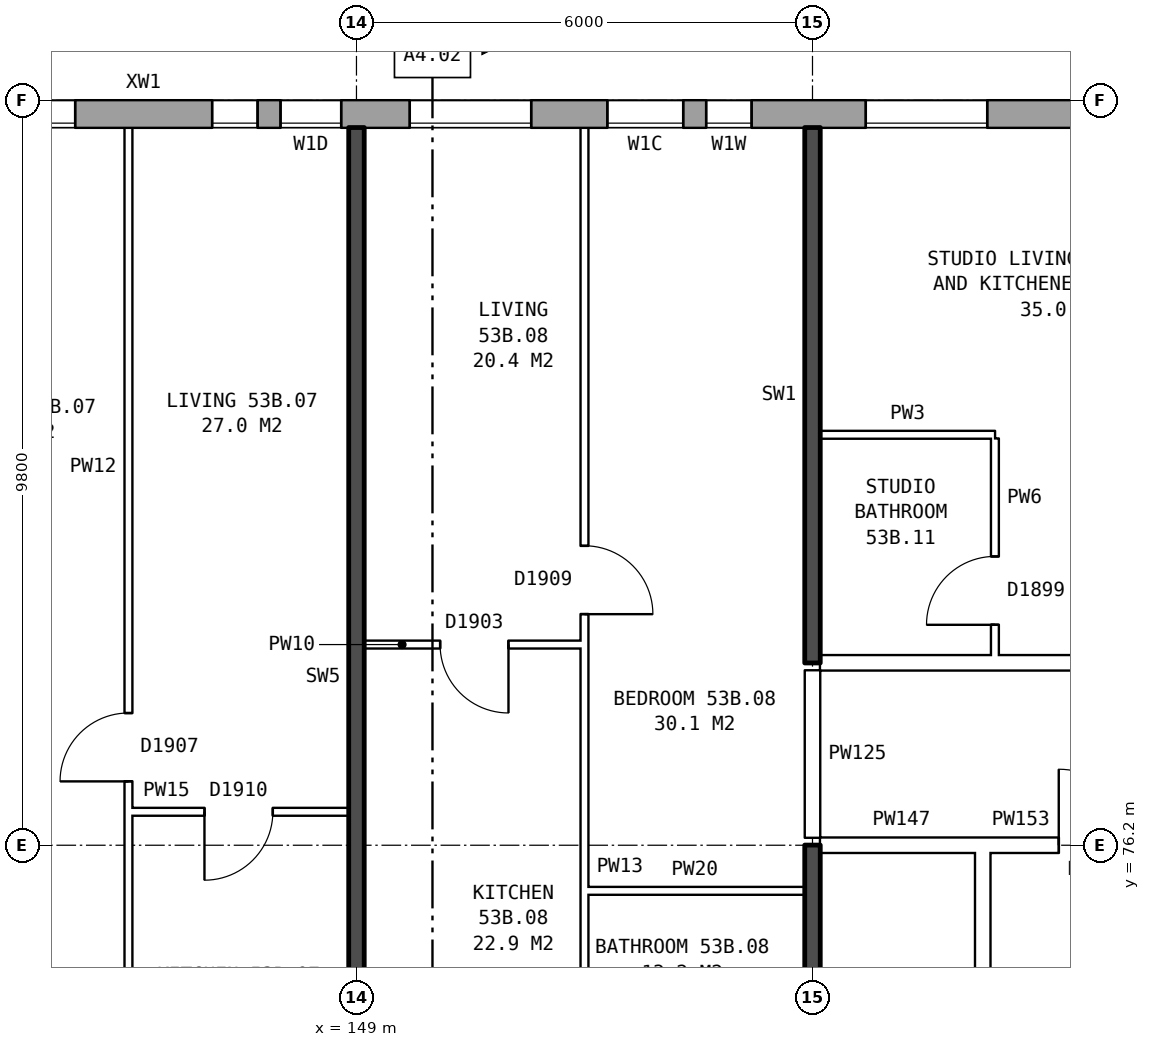
"""IFC4 building model, lengths in metres.
Left out: names, types, materials, properties, quantities, classifications, styles, units other than length and angle.
Written with IfcOpenShell. Run it as: python <this file> out.ifc"""

import sys

from ifc_helpers import new_model, si_unit, direction, frame, frame_2d, origin, place, context, subcontext, project, spatial, rectangle, extrude, element, fill, save


model = new_model("IFC4")
c1 = context("Model", 3, precision=1e-05, world=origin(), true_north=direction((0.0, 1.0)))
c2 = subcontext(c1, "Body", "Model", "MODEL_VIEW")
j1 = project(units=[si_unit("LENGTHUNIT", "METRE"), si_unit("PLANEANGLEUNIT", "RADIAN")], contexts=[c1])
p1 = place(None, origin())
s1 = spatial("IfcSite", under=j1, at=p1, CompositionType="ELEMENT")
p2 = place(p1, origin())
s2 = spatial("IfcBuilding", under=s1, at=p2, CompositionType="ELEMENT")
p3 = place(p2, frame((0.0, 0.0, 188.2)))
s3 = spatial("IfcBuildingStorey", under=s2, at=p3, CompositionType="ELEMENT", Elevation=188.2)
p4 = place(p3, frame((167.175, 85.82, 0.0), z_axis=(0.0, 0.0, 1.0), x_axis=(-1.0, 0.0, 0.0)))
e1 = element("IfcWall", 1, at=p4, inside=s3, PredefinedType="STANDARD", context=c2, shape_type="SweptSolid", body=[
    extrude(rectangle(XDim=33.101, YDim=0.36, at=frame_2d((16.55, 0.0))), origin(), (0.0, 0.0, 1.0), 2.85),
])
p5 = place(p4, frame((0.875, 0.0, 0.8)))
e2 = element("IfcOpeningElement", 2, at=p5, cuts=e1, PredefinedType="OPENING", context=c2, shape_type="SweptSolid", body=[
    extrude(rectangle(XDim=1.6, YDim=1.8, at=frame_2d((0.8, 0.9))), frame((0.0, 0.19, 0.0), z_axis=(0.0, -1.0, 0.0), x_axis=(1.0, 0.0, 0.0)), (0.0, 0.0, 1.0), 0.38),
])
p6 = place(p4, frame((3.875, 0.0, 0.8)))
e3 = element("IfcOpeningElement", 3, at=p6, cuts=e1, PredefinedType="OPENING", context=c2, shape_type="SweptSolid", body=[
    extrude(rectangle(XDim=1.6, YDim=1.8, at=frame_2d((0.8, 0.9))), frame((0.0, 0.19, 0.0), z_axis=(0.0, -1.0, 0.0), x_axis=(1.0, 0.0, 0.0)), (0.0, 0.0, 1.0), 0.38),
])
p7 = place(p4, frame((6.875, 0.0, 0.8)))
e4 = element("IfcOpeningElement", 4, at=p7, cuts=e1, PredefinedType="OPENING", context=c2, shape_type="SweptSolid", body=[
    extrude(rectangle(XDim=1.6, YDim=1.8, at=frame_2d((0.8, 0.9))), frame((0.0, 0.19, 0.0), z_axis=(0.0, -1.0, 0.0), x_axis=(1.0, 0.0, 0.0)), (0.0, 0.0, 1.0), 0.38),
])
p8 = place(p4, frame((9.875, 0.0, 0.8)))
e5 = element("IfcOpeningElement", 5, at=p8, cuts=e1, PredefinedType="OPENING", context=c2, shape_type="SweptSolid", body=[
    extrude(rectangle(XDim=1.6, YDim=1.8, at=frame_2d((0.8, 0.9))), frame((0.0, 0.19, 0.0), z_axis=(0.0, -1.0, 0.0), x_axis=(1.0, 0.0, 0.0)), (0.0, 0.0, 1.0), 0.38),
])
p9 = place(p4, frame((12.975, 0.0, 0.15)))
e6 = element("IfcOpeningElement", 6, at=p9, cuts=e1, PredefinedType="OPENING", context=c2, shape_type="SweptSolid", body=[
    extrude(rectangle(XDim=0.6, YDim=0.9, at=frame_2d((0.3, 0.45))), frame((0.0, 0.19, 0.0), z_axis=(0.0, -1.0, 0.0), x_axis=(1.0, 0.0, 0.0)), (0.0, 0.0, 1.0), 0.38),
])
p10 = place(p4, frame((15.875, 0.0, 0.8)))
e7 = element("IfcOpeningElement", 7, at=p10, cuts=e1, PredefinedType="OPENING", context=c2, shape_type="SweptSolid", body=[
    extrude(rectangle(XDim=1.6, YDim=1.8, at=frame_2d((0.8, 0.9))), frame((0.0, 0.19, 0.0), z_axis=(0.0, -1.0, 0.0), x_axis=(1.0, 0.0, 0.0)), (0.0, 0.0, 1.0), 0.38),
])
p11 = place(p4, frame((18.375, 0.0, 0.35)))
e8 = element("IfcOpeningElement", 8, at=p11, cuts=e1, PredefinedType="OPENING", context=c2, shape_type="SweptSolid", body=[
    extrude(rectangle(XDim=0.8, YDim=1.8, at=frame_2d((0.4, 0.9))), frame((0.0, 0.19, 0.0), z_axis=(0.0, -1.0, 0.0), x_axis=(1.0, 0.0, 0.0)), (0.0, 0.0, 1.0), 0.38),
])
p12 = place(p4, frame((21.875, 0.0, 0.8)))
e9 = element("IfcOpeningElement", 9, at=p12, cuts=e1, PredefinedType="OPENING", context=c2, shape_type="SweptSolid", body=[
    extrude(rectangle(XDim=1.6, YDim=1.8, at=frame_2d((0.8, 0.9))), frame((0.0, 0.19, 0.0), z_axis=(0.0, -1.0, 0.0), x_axis=(1.0, 0.0, 0.0)), (0.0, 0.0, 1.0), 0.38),
])
p13 = place(p4, frame((24.875, 0.0, 0.8)))
e10 = element("IfcOpeningElement", 10, at=p13, cuts=e1, PredefinedType="OPENING", context=c2, shape_type="SweptSolid", body=[
    extrude(rectangle(XDim=1.6, YDim=1.8, at=frame_2d((0.8, 0.9))), frame((0.0, 0.19, 0.0), z_axis=(0.0, -1.0, 0.0), x_axis=(1.0, 0.0, 0.0)), (0.0, 0.0, 1.0), 0.38),
])
p14 = place(p4, frame((27.875, 0.0, 0.8)))
e11 = element("IfcOpeningElement", 11, at=p14, cuts=e1, PredefinedType="OPENING", context=c2, shape_type="SweptSolid", body=[
    extrude(rectangle(XDim=1.6, YDim=1.8, at=frame_2d((0.8, 0.9))), frame((0.0, 0.19, 0.0), z_axis=(0.0, -1.0, 0.0), x_axis=(1.0, 0.0, 0.0)), (0.0, 0.0, 1.0), 0.38),
])
p15 = place(p4, frame((30.875, 0.0, 0.8)))
e12 = element("IfcOpeningElement", 12, at=p15, cuts=e1, PredefinedType="OPENING", context=c2, shape_type="SweptSolid", body=[
    extrude(rectangle(XDim=1.6, YDim=1.8, at=frame_2d((0.8, 0.9))), frame((0.0, 0.19, 0.0), z_axis=(0.0, -1.0, 0.0), x_axis=(1.0, 0.0, 0.0)), (0.0, 0.0, 1.0), 0.38),
])
p16 = place(p4, frame((13.875, 0.0, 0.25)))
e13 = element("IfcOpeningElement", 13, at=p16, cuts=e1, PredefinedType="OPENING", context=c2, shape_type="SweptSolid", body=[
    extrude(rectangle(XDim=1.0, YDim=1.8, at=frame_2d((0.5, 0.9))), frame((0.0, 0.19, 0.0), z_axis=(0.0, -1.0, 0.0), x_axis=(1.0, 0.0, 0.0)), (0.0, 0.0, 1.0), 0.38),
])
p17 = place(p4, frame((19.475, 0.0, 0.15)))
e14 = element("IfcOpeningElement", 14, at=p17, cuts=e1, PredefinedType="OPENING", context=c2, shape_type="SweptSolid", body=[
    extrude(rectangle(XDim=0.6, YDim=0.9, at=frame_2d((0.3, 0.45))), frame((0.0, 0.19, 0.0), z_axis=(0.0, -1.0, 0.0), x_axis=(1.0, 0.0, 0.0)), (0.0, 0.0, 1.0), 0.38),
])
p18 = place(p3, frame((157.24, 63.9, 0.0), z_axis=(0.0, 0.0, 1.0), x_axis=(0.0, 1.0, 0.0)))
e15 = element("IfcWall", 15, at=p18, inside=s3, PredefinedType="PARTITIONING", context=c2, shape_type="SweptSolid", body=[
    extrude(rectangle(XDim=12.2, YDim=0.2, at=frame_2d((6.1, 0.0))), origin(), (0.0, 0.0, 1.0), 2.85),
])
p19 = place(p18, frame((5.1, 0.0, 0.0)))
e16 = element("IfcOpeningElement", 16, at=p19, cuts=e15, PredefinedType="OPENING", context=c2, shape_type="SweptSolid", body=[
    extrude(rectangle(XDim=2.0, YDim=2.1, at=frame_2d((1.0, 1.05))), frame((0.0, 0.11, 0.0), z_axis=(0.0, -1.0, 0.0), x_axis=(1.0, 0.0, 0.0)), (0.0, 0.0, 1.0), 0.22),
])
p20 = place(p3, frame((152.0, 75.6, 0.0), z_axis=(0.0, 0.0, 1.0), x_axis=(1.0, 0.0, 0.0)))
e17 = element("IfcWall", 17, at=p20, inside=s3, PredefinedType="PARTITIONING", context=c2, shape_type="SweptSolid", body=[
    extrude(rectangle(XDim=2.9, YDim=0.1, at=frame_2d((1.45, 0.0))), origin(), (0.0, 0.0, 1.0), 2.85),
])
p21 = place(p3, frame((155.1, 76.2, 0.0), z_axis=(0.0, 0.0, 1.0), x_axis=(1.0, 0.0, 0.0)))
e18 = element("IfcWall", 18, at=p21, inside=s3, PredefinedType="PARTITIONING", context=c2, shape_type="SweptSolid", body=[
    extrude(rectangle(XDim=2.14, YDim=0.2, at=frame_2d((1.07, 0.0))), origin(), (0.0, 0.0, 1.0), 2.85),
])
p22 = place(p3, frame((157.24, 76.2, 0.0), z_axis=(0.0, 0.0, 1.0), x_axis=(1.0, 0.0, 0.0)))
e19 = element("IfcWall", 19, at=p22, inside=s3, PredefinedType="PARTITIONING", context=c2, shape_type="SweptSolid", body=[
    extrude(rectangle(XDim=3.0, YDim=0.2, at=frame_2d((1.5, 0.0))), origin(), (0.0, 0.0, 1.0), 2.85),
])
p23 = place(p22, frame((1.0, 0.0, 0.0)))
e20 = element("IfcOpeningElement", 20, at=p23, cuts=e19, PredefinedType="OPENING", context=c2, shape_type="SweptSolid", body=[
    extrude(rectangle(XDim=1.0, YDim=2.1, at=frame_2d((0.5, 1.05))), frame((0.0, 0.11, 0.0), z_axis=(0.0, -1.0, 0.0), x_axis=(1.0, 0.0, 0.0)), (0.0, 0.0, 1.0), 0.22),
])
p24 = place(p3, frame((146.0, 76.64, 0.0), z_axis=(0.0, 0.0, 1.0), x_axis=(1.0, 0.0, 0.0)))
e21 = element("IfcWall", 21, at=p24, inside=s3, PredefinedType="PARTITIONING", context=c2, shape_type="SweptSolid", body=[
    extrude(rectangle(XDim=2.9, YDim=0.1, at=frame_2d((1.45, 0.0))), origin(), (0.0, 0.0, 1.0), 2.85),
])
p25 = place(p24, frame((1.0, 0.0, 0.0)))
e22 = element("IfcOpeningElement", 22, at=p25, cuts=e21, PredefinedType="OPENING", context=c2, shape_type="SweptSolid", body=[
    extrude(rectangle(XDim=0.9, YDim=2.1, at=frame_2d((0.45, 1.05))), frame((0.0, 0.06, 0.0), z_axis=(0.0, -1.0, 0.0), x_axis=(1.0, 0.0, 0.0)), (0.0, 0.0, 1.0), 0.12),
])
p26 = place(p3, frame((155.1, 78.6, 0.0), z_axis=(0.0, 0.0, 1.0), x_axis=(1.0, 0.0, 0.0)))
e23 = element("IfcWall", 23, at=p26, inside=s3, PredefinedType="PARTITIONING", context=c2, shape_type="SweptSolid", body=[
    extrude(rectangle(XDim=14.79, YDim=0.2, at=frame_2d((7.395, 0.0))), origin(), (0.0, 0.0, 1.0), 2.85),
])
p27 = place(p26, frame((3.6, 0.0, 0.0)))
e24 = element("IfcOpeningElement", 24, at=p27, cuts=e23, PredefinedType="OPENING", context=c2, shape_type="SweptSolid", body=[
    extrude(rectangle(XDim=1.0, YDim=2.1, at=frame_2d((0.5, 1.05))), frame((0.0, 0.11, 0.0), z_axis=(0.0, -1.0, 0.0), x_axis=(1.0, 0.0, 0.0)), (0.0, 0.0, 1.0), 0.22),
])
p28 = place(p26, frame((7.2, 0.0, 0.0)))
e25 = element("IfcOpeningElement", 25, at=p28, cuts=e23, PredefinedType="OPENING", context=c2, shape_type="SweptSolid", body=[
    extrude(rectangle(XDim=1.0, YDim=2.1, at=frame_2d((0.5, 1.05))), frame((0.0, 0.11, 0.0), z_axis=(0.0, -1.0, 0.0), x_axis=(1.0, 0.0, 0.0)), (0.0, 0.0, 1.0), 0.22),
])
p29 = place(p3, frame((149.1, 78.84, 0.0), z_axis=(0.0, 0.0, 1.0), x_axis=(1.0, 0.0, 0.0)))
e26 = element("IfcWall", 26, at=p29, inside=s3, PredefinedType="PARTITIONING", context=c2, shape_type="SweptSolid", body=[
    extrude(rectangle(XDim=2.9, YDim=0.1, at=frame_2d((1.45, 0.0))), origin(), (0.0, 0.0, 1.0), 2.85),
])
p30 = place(p29, frame((1.0, 0.0, 0.0)))
e27 = element("IfcOpeningElement", 27, at=p30, cuts=e26, PredefinedType="OPENING", context=c2, shape_type="SweptSolid", body=[
    extrude(rectangle(XDim=0.9, YDim=2.1, at=frame_2d((0.45, 1.05))), frame((0.0, 0.06, 0.0), z_axis=(0.0, -1.0, 0.0), x_axis=(1.0, 0.0, 0.0)), (0.0, 0.0, 1.0), 0.12),
])
p31 = place(p3, frame((155.1, 81.6, 0.0), z_axis=(0.0, 0.0, 1.0), x_axis=(1.0, 0.0, 0.0)))
e28 = element("IfcWall", 28, at=p31, inside=s3, PredefinedType="PARTITIONING", context=c2, shape_type="SweptSolid", body=[
    extrude(rectangle(XDim=2.3, YDim=0.1, at=frame_2d((1.15, 0.0))), origin(), (0.0, 0.0, 1.0), 2.85),
])
p32 = place(p3, frame((146.0, 71.3, 0.0), z_axis=(0.0, 0.0, 1.0), x_axis=(0.0, 1.0, 0.0)))
e29 = element("IfcWall", 29, at=p32, inside=s3, PredefinedType="PARTITIONING", context=c2, shape_type="SweptSolid", body=[
    extrude(rectangle(XDim=14.34, YDim=0.1, at=frame_2d((7.17, 0.0))), origin(), (0.0, 0.0, 1.0), 2.85),
])
p33 = place(p32, frame((5.74, 0.0, 0.0)))
e30 = element("IfcOpeningElement", 30, at=p33, cuts=e29, PredefinedType="OPENING", context=c2, shape_type="SweptSolid", body=[
    extrude(rectangle(XDim=0.9, YDim=2.1, at=frame_2d((0.45, 1.05))), frame((0.0, 0.06, 0.0), z_axis=(0.0, -1.0, 0.0), x_axis=(1.0, 0.0, 0.0)), (0.0, 0.0, 1.0), 0.12),
])
p34 = place(p32, frame((0.4, 0.0, 0.0)))
e31 = element("IfcOpeningElement", 31, at=p34, cuts=e29, PredefinedType="OPENING", context=c2, shape_type="SweptSolid", body=[
    extrude(rectangle(XDim=0.9, YDim=2.1, at=frame_2d((0.45, 1.05))), frame((0.0, 0.06, 0.0), z_axis=(0.0, -1.0, 0.0), x_axis=(1.0, 0.0, 0.0)), (0.0, 0.0, 1.0), 0.12),
])
p35 = place(p3, frame((149.0, 71.2, 0.0), z_axis=(0.0, 0.0, 1.0), x_axis=(0.0, 1.0, 0.0)))
e32 = element("IfcWall", 32, at=p35, inside=s3, PredefinedType="SOLIDWALL", context=c2, shape_type="SweptSolid", body=[
    extrude(rectangle(XDim=14.44, YDim=0.2, at=frame_2d((7.22, 0.0))), origin(), (0.0, 0.0, 1.0), 2.85),
])
p36 = place(p3, frame((152.0, 71.3, 0.0), z_axis=(0.0, 0.0, 1.0), x_axis=(0.0, 1.0, 0.0)))
e33 = element("IfcWall", 33, at=p36, inside=s3, PredefinedType="PARTITIONING", context=c2, shape_type="SweptSolid", body=[
    extrude(rectangle(XDim=14.34, YDim=0.1, at=frame_2d((7.17, 0.0))), origin(), (0.0, 0.0, 1.0), 2.85),
])
p37 = place(p36, frame((7.94, 0.0, 0.0)))
e34 = element("IfcOpeningElement", 34, at=p37, cuts=e33, PredefinedType="OPENING", context=c2, shape_type="SweptSolid", body=[
    extrude(rectangle(XDim=0.9, YDim=2.1, at=frame_2d((0.45, 1.05))), frame((0.0, 0.06, 0.0), z_axis=(0.0, -1.0, 0.0), x_axis=(1.0, 0.0, 0.0)), (0.0, 0.0, 1.0), 0.12),
])
p38 = place(p36, frame((0.4, 0.0, 0.0)))
e35 = element("IfcOpeningElement", 35, at=p38, cuts=e33, PredefinedType="OPENING", context=c2, shape_type="SweptSolid", body=[
    extrude(rectangle(XDim=0.9, YDim=2.1, at=frame_2d((0.45, 1.05))), frame((0.0, 0.06, 0.0), z_axis=(0.0, -1.0, 0.0), x_axis=(1.0, 0.0, 0.0)), (0.0, 0.0, 1.0), 0.12),
])
p39 = place(p3, frame((155.0, 71.2, 0.0), z_axis=(0.0, 0.0, 1.0), x_axis=(0.0, 1.0, 0.0)))
e36 = element("IfcWall", 36, at=p39, inside=s3, PredefinedType="SOLIDWALL", context=c2, shape_type="SweptSolid", body=[
    extrude(rectangle(XDim=5.0, YDim=0.2, at=frame_2d((2.5, 0.0))), origin(), (0.0, 0.0, 1.0), 2.85),
])
p40 = place(p3, frame((155.0, 76.3, 0.0), z_axis=(0.0, 0.0, 1.0), x_axis=(0.0, 1.0, 0.0)))
e37 = element("IfcWall", 37, at=p40, inside=s3, PredefinedType="PARTITIONING", context=c2, shape_type="SweptSolid", body=[
    extrude(rectangle(XDim=2.2, YDim=0.2, at=frame_2d((1.1, 0.0))), origin(), (0.0, 0.0, 1.0), 2.85),
])
p41 = place(p3, frame((155.0, 78.6, 0.0), z_axis=(0.0, 0.0, 1.0), x_axis=(0.0, 1.0, 0.0)))
e38 = element("IfcWall", 38, at=p41, inside=s3, PredefinedType="SOLIDWALL", context=c2, shape_type="SweptSolid", body=[
    extrude(rectangle(XDim=7.04, YDim=0.2, at=frame_2d((3.52, 0.0))), origin(), (0.0, 0.0, 1.0), 2.85),
])
p42 = place(p3, frame((157.4, 78.7, 0.0), z_axis=(0.0, 0.0, 1.0), x_axis=(0.0, 1.0, 0.0)))
e39 = element("IfcWall", 39, at=p42, inside=s3, PredefinedType="PARTITIONING", context=c2, shape_type="SweptSolid", body=[
    extrude(rectangle(XDim=2.85, YDim=0.1, at=frame_2d((1.425, 0.0))), origin(), (0.0, 0.0, 1.0), 2.85),
])
p43 = place(p42, frame((0.4, 0.0, 0.0)))
e40 = element("IfcOpeningElement", 40, at=p43, cuts=e39, PredefinedType="OPENING", context=c2, shape_type="SweptSolid", body=[
    extrude(rectangle(XDim=0.9, YDim=2.1, at=frame_2d((0.45, 1.05))), frame((0.0, 0.06, 0.0), z_axis=(0.0, -1.0, 0.0), x_axis=(1.0, 0.0, 0.0)), (0.0, 0.0, 1.0), 0.12),
])
p44 = place(p8, origin())
e41 = element("IfcWindow", 41, at=p44, inside=s3, PartitioningType="SINGLE_PANEL", PredefinedType="WINDOW", context=c2, shape_type="SweptSolid", body=[
    extrude(rectangle(XDim=1.6, YDim=1.8, at=frame_2d((0.8, 0.9))), frame((0.0, 0.15, 0.0), z_axis=(0.0, -1.0, 0.0), x_axis=(1.0, 0.0, 0.0)), (0.0, 0.0, 1.0), 0.06),
])
fill(e5, e41)
p45 = place(p9, origin())
e42 = element("IfcWindow", 42, at=p45, inside=s3, PartitioningType="SINGLE_PANEL", PredefinedType="WINDOW", context=c2, shape_type="SweptSolid", body=[
    extrude(rectangle(XDim=0.6, YDim=0.9, at=frame_2d((0.3, 0.45))), frame((0.0, 0.15, 0.0), z_axis=(0.0, -1.0, 0.0), x_axis=(1.0, 0.0, 0.0)), (0.0, 0.0, 1.0), 0.06),
])
fill(e6, e42)
p46 = place(p10, origin())
e43 = element("IfcWindow", 43, at=p46, inside=s3, PartitioningType="SINGLE_PANEL", PredefinedType="WINDOW", context=c2, shape_type="SweptSolid", body=[
    extrude(rectangle(XDim=1.6, YDim=1.8, at=frame_2d((0.8, 0.9))), frame((0.0, 0.15, 0.0), z_axis=(0.0, -1.0, 0.0), x_axis=(1.0, 0.0, 0.0)), (0.0, 0.0, 1.0), 0.06),
])
fill(e7, e43)
p47 = place(p11, origin())
e44 = element("IfcWindow", 44, at=p47, inside=s3, PartitioningType="SINGLE_PANEL", PredefinedType="WINDOW", context=c2, shape_type="SweptSolid", body=[
    extrude(rectangle(XDim=0.8, YDim=1.8, at=frame_2d((0.4, 0.9))), frame((0.0, 0.15, 0.0), z_axis=(0.0, -1.0, 0.0), x_axis=(1.0, 0.0, 0.0)), (0.0, 0.0, 1.0), 0.06),
])
fill(e8, e44)
p48 = place(p12, origin())
e45 = element("IfcWindow", 45, at=p48, inside=s3, PartitioningType="SINGLE_PANEL", PredefinedType="WINDOW", context=c2, shape_type="SweptSolid", body=[
    extrude(rectangle(XDim=1.6, YDim=1.8, at=frame_2d((0.8, 0.9))), frame((0.0, 0.15, 0.0), z_axis=(0.0, -1.0, 0.0), x_axis=(1.0, 0.0, 0.0)), (0.0, 0.0, 1.0), 0.06),
])
fill(e9, e45)
p49 = place(p23, origin())
e46 = element("IfcDoor", 46, at=p49, inside=s3, OperationType="SINGLE_SWING_LEFT", PredefinedType="DOOR", context=c2, shape_type="SweptSolid", body=[
    extrude(rectangle(XDim=1.0, YDim=2.1, at=frame_2d((0.5, 1.05))), frame((0.0, 0.025, 0.0), z_axis=(0.0, -1.0, 0.0), x_axis=(1.0, 0.0, 0.0)), (0.0, 0.0, 1.0), 0.05),
])
fill(e20, e46)
p50 = place(p33, origin())
e47 = element("IfcDoor", 47, at=p50, inside=s3, OperationType="SINGLE_SWING_LEFT", PredefinedType="DOOR", context=c2, shape_type="SweptSolid", body=[
    extrude(rectangle(XDim=0.9, YDim=2.1, at=frame_2d((0.45, 1.05))), frame((0.0, 0.025, 0.0), z_axis=(0.0, -1.0, 0.0), x_axis=(1.0, 0.0, 0.0)), (0.0, 0.0, 1.0), 0.05),
])
fill(e30, e47)
p51 = place(p25, frame((0.9, 0.0, 0.0), z_axis=(0.0, 0.0, 1.0), x_axis=(-1.0, 0.0, 0.0)))
e48 = element("IfcDoor", 48, at=p51, inside=s3, OperationType="SINGLE_SWING_RIGHT", PredefinedType="DOOR", context=c2, shape_type="SweptSolid", body=[
    extrude(rectangle(XDim=0.9, YDim=2.1, at=frame_2d((0.45, 1.05))), frame((0.0, 0.025, 0.0), z_axis=(0.0, -1.0, 0.0), x_axis=(1.0, 0.0, 0.0)), (0.0, 0.0, 1.0), 0.05),
])
fill(e22, e48)
p52 = place(p37, frame((0.9, 0.0, 0.0), z_axis=(0.0, 0.0, 1.0), x_axis=(-1.0, 0.0, 0.0)))
e49 = element("IfcDoor", 49, at=p52, inside=s3, OperationType="SINGLE_SWING_RIGHT", PredefinedType="DOOR", context=c2, shape_type="SweptSolid", body=[
    extrude(rectangle(XDim=0.9, YDim=2.1, at=frame_2d((0.45, 1.05))), frame((0.0, 0.025, 0.0), z_axis=(0.0, -1.0, 0.0), x_axis=(1.0, 0.0, 0.0)), (0.0, 0.0, 1.0), 0.05),
])
fill(e34, e49)
p53 = place(p30, frame((0.9, 0.0, 0.0), z_axis=(0.0, 0.0, 1.0), x_axis=(-1.0, 0.0, 0.0)))
e50 = element("IfcDoor", 50, at=p53, inside=s3, OperationType="SINGLE_SWING_LEFT", PredefinedType="DOOR", context=c2, shape_type="SweptSolid", body=[
    extrude(rectangle(XDim=0.9, YDim=2.1, at=frame_2d((0.45, 1.05))), frame((0.0, 0.025, 0.0), z_axis=(0.0, -1.0, 0.0), x_axis=(1.0, 0.0, 0.0)), (0.0, 0.0, 1.0), 0.05),
])
fill(e27, e50)
p54 = place(p43, origin())
e51 = element("IfcDoor", 51, at=p54, inside=s3, OperationType="SINGLE_SWING_LEFT", PredefinedType="DOOR", context=c2, shape_type="SweptSolid", body=[
    extrude(rectangle(XDim=0.9, YDim=2.1, at=frame_2d((0.45, 1.05))), frame((0.0, 0.025, 0.0), z_axis=(0.0, -1.0, 0.0), x_axis=(1.0, 0.0, 0.0)), (0.0, 0.0, 1.0), 0.05),
])
fill(e40, e51)
p55 = place(p16, origin())
e52 = element("IfcWindow", 52, at=p55, inside=s3, PartitioningType="SINGLE_PANEL", PredefinedType="WINDOW", context=c2, shape_type="SweptSolid", body=[
    extrude(rectangle(XDim=1.0, YDim=1.8, at=frame_2d((0.5, 0.9))), frame((0.0, 0.15, 0.0), z_axis=(0.0, -1.0, 0.0), x_axis=(1.0, 0.0, 0.0)), (0.0, 0.0, 1.0), 0.06),
])
fill(e13, e52)
p56 = place(p17, origin())
e53 = element("IfcWindow", 53, at=p56, inside=s3, PartitioningType="SINGLE_PANEL", PredefinedType="WINDOW", context=c2, shape_type="SweptSolid", body=[
    extrude(rectangle(XDim=0.6, YDim=0.9, at=frame_2d((0.3, 0.45))), frame((0.0, 0.15, 0.0), z_axis=(0.0, -1.0, 0.0), x_axis=(1.0, 0.0, 0.0)), (0.0, 0.0, 1.0), 0.06),
])
fill(e14, e53)
save(model, sys.argv[1])
